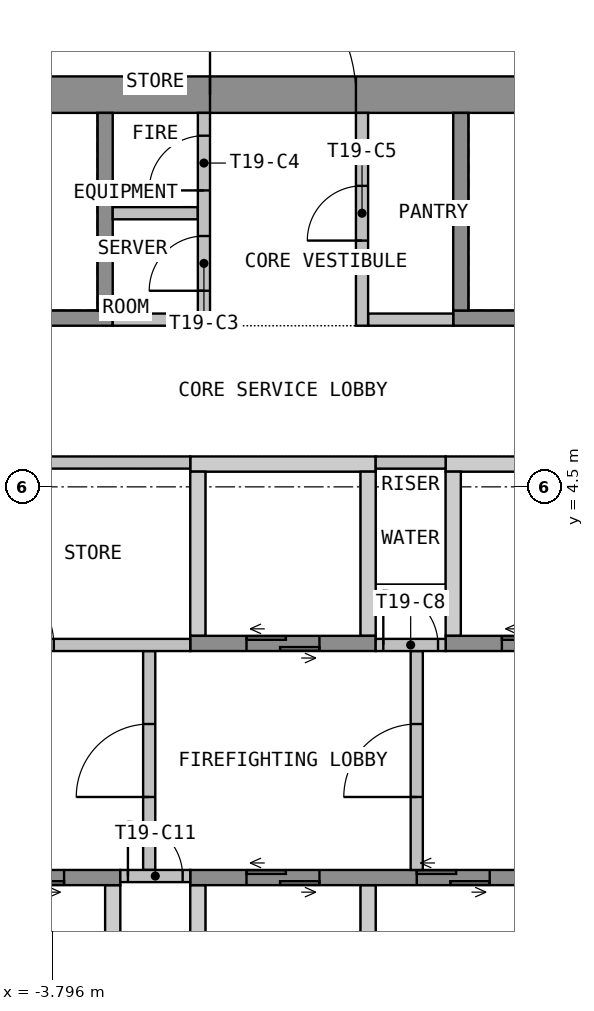
"""IFC4 building model, lengths in metres.
Left out: names, types, materials, properties, quantities, classifications, styles, units other than length and angle.
Written with IfcOpenShell. Run it as: python <this file> out.ifc"""

import sys

from ifc_helpers import new_model, si_unit, direction, frame, frame_2d, origin, place, context, subcontext, project, spatial, polyline, rectangle, outline, extrude, element, fill, save


model = new_model("IFC4")
c1 = context("Model", 3, precision=1e-05, world=origin(), true_north=direction((0.0, 1.0)))
c2 = subcontext(c1, "Body", "Model", "MODEL_VIEW")
j1 = project(units=[si_unit("LENGTHUNIT", "METRE"), si_unit("PLANEANGLEUNIT", "RADIAN")], contexts=[c1])
p1 = place(None, origin())
s1 = spatial("IfcSite", under=j1, at=p1, CompositionType="ELEMENT")
p2 = place(p1, origin())
s2 = spatial("IfcBuilding", under=s1, at=p2, CompositionType="ELEMENT")
p3 = place(p2, frame((0.0, 0.0, 258.6)))
s3 = spatial("IfcBuildingStorey", under=s2, at=p3, CompositionType="ELEMENT", Elevation=258.6)
p4 = place(p3, frame((-13.5, 10.95, 0.0), z_axis=(0.0, 0.0, 1.0), x_axis=(1.0, 0.0, 0.0)))
e1 = element("IfcWall", 1, at=p4, inside=s3, PredefinedType="SHEAR", context=c2, shape_type="SweptSolid", body=[
    extrude(rectangle(XDim=27.0, YDim=0.6, at=frame_2d((13.5, 0.0))), origin(), (0.0, 0.0, 1.0), 3.575),
])
p5 = place(p4, frame((12.3, 0.0, 0.0)))
e2 = element("IfcOpeningElement", 2, at=p5, cuts=e1, PredefinedType="OPENING", context=c2, shape_type="SweptSolid", body=[
    extrude(rectangle(XDim=2.4, YDim=2.1, at=frame_2d((1.2, 1.05))), frame((0.0, 0.31, 0.0), z_axis=(0.0, -1.0, 0.0), x_axis=(1.0, 0.0, 0.0)), (0.0, 0.0, 1.0), 0.62),
])
p6 = place(p4, frame((1.05, 0.0, 0.0)))
e3 = element("IfcOpeningElement", 3, at=p6, cuts=e1, PredefinedType="OPENING", context=c2, shape_type="SweptSolid", body=[
    extrude(rectangle(XDim=1.2, YDim=2.1, at=frame_2d((0.6, 1.05))), frame((0.0, 0.31, 0.0), z_axis=(0.0, -1.0, 0.0), x_axis=(1.0, 0.0, 0.0)), (0.0, 0.0, 1.0), 0.62),
])
p7 = place(p4, frame((24.75, 0.0, 0.0)))
e4 = element("IfcOpeningElement", 4, at=p7, cuts=e1, PredefinedType="OPENING", context=c2, shape_type="SweptSolid", body=[
    extrude(rectangle(XDim=1.2, YDim=2.1, at=frame_2d((0.6, 1.05))), frame((0.0, 0.31, 0.0), z_axis=(0.0, -1.0, 0.0), x_axis=(1.0, 0.0, 0.0)), (0.0, 0.0, 1.0), 0.62),
])
p8 = place(p3, origin())
e5 = element("IfcWall", 5, at=p8, inside=s3, PredefinedType="SHEAR", context=c2, shape_type="SweptSolid", body=[
    extrude(outline(polyline([(-1.525, 4.75), (1.525, 4.75), (1.525, 5.0), (-1.525, 5.0), (-1.525, 4.75)])), origin(), (0.0, 0.0, 1.0), 3.575),
])
p9 = place(p3, origin())
e6 = element("IfcWall", 6, at=p9, inside=s3, PredefinedType="SHEAR", context=c2, shape_type="SweptSolid", body=[
    extrude(outline(polyline([(2.675, 4.75), (8.525, 4.75), (8.525, 5.0), (2.675, 5.0), (2.675, 4.75)])), origin(), (0.0, 0.0, 1.0), 3.575),
])
p10 = place(p3, origin())
e7 = element("IfcWall", 7, at=p10, inside=s3, PredefinedType="SHEAR", context=c2, shape_type="SweptSolid", body=[
    extrude(outline(polyline([(-1.525, 2.05), (-1.275, 2.05), (-1.275, 4.75), (-1.525, 4.75), (-1.525, 2.05)])), origin(), (0.0, 0.0, 1.0), 3.575),
])
p11 = place(p3, origin())
e8 = element("IfcWall", 8, at=p11, inside=s3, PredefinedType="SHEAR", context=c2, shape_type="SweptSolid", body=[
    extrude(outline(polyline([(1.275, 2.05), (1.525, 2.05), (1.525, 4.75), (1.275, 4.75), (1.275, 2.05)])), origin(), (0.0, 0.0, 1.0), 3.575),
])
p12 = place(p3, origin())
e9 = element("IfcWall", 9, at=p12, inside=s3, PredefinedType="SHEAR", context=c2, shape_type="SweptSolid", body=[
    extrude(outline(polyline([(2.675, 2.05), (2.925, 2.05), (2.925, 4.75), (2.675, 4.75), (2.675, 2.05)])), origin(), (0.0, 0.0, 1.0), 3.575),
])
p13 = place(p3, frame((-1.525, 1.925, 0.0), z_axis=(0.0, 0.0, 1.0), x_axis=(1.0, 0.0, 0.0)))
e10 = element("IfcWall", 10, at=p13, inside=s3, PredefinedType="SHEAR", context=c2, shape_type="SweptSolid", body=[
    extrude(rectangle(XDim=3.05, YDim=0.25, at=frame_2d((1.525, 0.0))), origin(), (0.0, 0.0, 1.0), 3.575),
])
p14 = place(p13, frame((0.925, 0.0, 0.0)))
e11 = element("IfcOpeningElement", 11, at=p14, cuts=e10, PredefinedType="OPENING", context=c2, shape_type="SweptSolid", body=[
    extrude(rectangle(XDim=1.2, YDim=2.1, at=frame_2d((0.6, 1.05))), frame((0.0, 0.135, 0.0), z_axis=(0.0, -1.0, 0.0), x_axis=(1.0, 0.0, 0.0)), (0.0, 0.0, 1.0), 0.27),
])
p15 = place(p3, frame((2.675, 1.925, 0.0), z_axis=(0.0, 0.0, 1.0), x_axis=(1.0, 0.0, 0.0)))
e12 = element("IfcWall", 12, at=p15, inside=s3, PredefinedType="SHEAR", context=c2, shape_type="SweptSolid", body=[
    extrude(rectangle(XDim=5.85, YDim=0.25, at=frame_2d((2.925, 0.0))), origin(), (0.0, 0.0, 1.0), 3.575),
])
p16 = place(p15, frame((0.925, 0.0, 0.0)))
e13 = element("IfcOpeningElement", 13, at=p16, cuts=e12, PredefinedType="OPENING", context=c2, shape_type="SweptSolid", body=[
    extrude(rectangle(XDim=1.2, YDim=2.1, at=frame_2d((0.6, 1.05))), frame((0.0, 0.135, 0.0), z_axis=(0.0, -1.0, 0.0), x_axis=(1.0, 0.0, 0.0)), (0.0, 0.0, 1.0), 0.27),
])
p17 = place(p15, frame((3.725, 0.0, 0.0)))
e14 = element("IfcOpeningElement", 14, at=p17, cuts=e12, PredefinedType="OPENING", context=c2, shape_type="SweptSolid", body=[
    extrude(rectangle(XDim=1.2, YDim=2.1, at=frame_2d((0.6, 1.05))), frame((0.0, 0.135, 0.0), z_axis=(0.0, -1.0, 0.0), x_axis=(1.0, 0.0, 0.0)), (0.0, 0.0, 1.0), 0.27),
])
p18 = place(p3, origin())
e15 = element("IfcWall", 15, at=p18, inside=s3, PredefinedType="SHEAR", context=c2, shape_type="SweptSolid", body=[
    extrude(outline(polyline([(-2.925, -4.75), (-2.675, -4.75), (-2.675, -2.05), (-2.925, -2.05), (-2.925, -4.75)])), origin(), (0.0, 0.0, 1.0), 3.575),
])
p19 = place(p3, origin())
e16 = element("IfcWall", 16, at=p19, inside=s3, PredefinedType="SHEAR", context=c2, shape_type="SweptSolid", body=[
    extrude(outline(polyline([(-1.525, -4.75), (-1.275, -4.75), (-1.275, -2.05), (-1.525, -2.05), (-1.525, -4.75)])), origin(), (0.0, 0.0, 1.0), 3.575),
])
p20 = place(p3, origin())
e17 = element("IfcWall", 17, at=p20, inside=s3, PredefinedType="SHEAR", context=c2, shape_type="SweptSolid", body=[
    extrude(outline(polyline([(1.275, -4.75), (1.525, -4.75), (1.525, -2.05), (1.275, -2.05), (1.275, -4.75)])), origin(), (0.0, 0.0, 1.0), 3.575),
])
p21 = place(p3, frame((-11.325, -1.925, 0.0), z_axis=(0.0, 0.0, 1.0), x_axis=(1.0, 0.0, 0.0)))
e18 = element("IfcWall", 18, at=p21, inside=s3, PredefinedType="SHEAR", context=c2, shape_type="SweptSolid", body=[
    extrude(rectangle(XDim=8.65, YDim=0.25, at=frame_2d((4.325, 0.0))), origin(), (0.0, 0.0, 1.0), 3.575),
])
p22 = place(p21, frame((0.925, 0.0, 0.0)))
e19 = element("IfcOpeningElement", 19, at=p22, cuts=e18, PredefinedType="OPENING", context=c2, shape_type="SweptSolid", body=[
    extrude(rectangle(XDim=1.2, YDim=2.1, at=frame_2d((0.6, 1.05))), frame((0.0, 0.135, 0.0), z_axis=(0.0, -1.0, 0.0), x_axis=(1.0, 0.0, 0.0)), (0.0, 0.0, 1.0), 0.27),
])
p23 = place(p21, frame((3.725, 0.0, 0.0)))
e20 = element("IfcOpeningElement", 20, at=p23, cuts=e18, PredefinedType="OPENING", context=c2, shape_type="SweptSolid", body=[
    extrude(rectangle(XDim=1.2, YDim=2.1, at=frame_2d((0.6, 1.05))), frame((0.0, 0.135, 0.0), z_axis=(0.0, -1.0, 0.0), x_axis=(1.0, 0.0, 0.0)), (0.0, 0.0, 1.0), 0.27),
])
p24 = place(p21, frame((6.525, 0.0, 0.0)))
e21 = element("IfcOpeningElement", 21, at=p24, cuts=e18, PredefinedType="OPENING", context=c2, shape_type="SweptSolid", body=[
    extrude(rectangle(XDim=1.2, YDim=2.1, at=frame_2d((0.6, 1.05))), frame((0.0, 0.135, 0.0), z_axis=(0.0, -1.0, 0.0), x_axis=(1.0, 0.0, 0.0)), (0.0, 0.0, 1.0), 0.27),
])
p25 = place(p3, frame((-1.525, -1.925, 0.0), z_axis=(0.0, 0.0, 1.0), x_axis=(1.0, 0.0, 0.0)))
e22 = element("IfcWall", 22, at=p25, inside=s3, PredefinedType="SHEAR", context=c2, shape_type="SweptSolid", body=[
    extrude(rectangle(XDim=5.85, YDim=0.25, at=frame_2d((2.925, 0.0))), origin(), (0.0, 0.0, 1.0), 3.575),
])
p26 = place(p25, frame((0.925, 0.0, 0.0)))
e23 = element("IfcOpeningElement", 23, at=p26, cuts=e22, PredefinedType="OPENING", context=c2, shape_type="SweptSolid", body=[
    extrude(rectangle(XDim=1.2, YDim=2.1, at=frame_2d((0.6, 1.05))), frame((0.0, 0.135, 0.0), z_axis=(0.0, -1.0, 0.0), x_axis=(1.0, 0.0, 0.0)), (0.0, 0.0, 1.0), 0.27),
])
p27 = place(p25, frame((3.725, 0.0, 0.0)))
e24 = element("IfcOpeningElement", 24, at=p27, cuts=e22, PredefinedType="OPENING", context=c2, shape_type="SweptSolid", body=[
    extrude(rectangle(XDim=1.2, YDim=2.1, at=frame_2d((0.6, 1.05))), frame((0.0, 0.135, 0.0), z_axis=(0.0, -1.0, 0.0), x_axis=(1.0, 0.0, 0.0)), (0.0, 0.0, 1.0), 0.27),
])
p28 = place(p3, frame((-2.2, -1.8, 0.0), z_axis=(0.0, 0.0, 1.0), x_axis=(0.0, 1.0, 0.0)))
e25 = element("IfcWall", 25, at=p28, inside=s3, PredefinedType="PARTITIONING", context=c2, shape_type="SweptSolid", body=[
    extrude(rectangle(XDim=3.6, YDim=0.2, at=frame_2d((1.8, 0.0))), origin(), (0.0, 0.0, 1.0), 3.575),
])
p29 = place(p28, frame((1.2, 0.0, 0.0)))
e26 = element("IfcOpeningElement", 26, at=p29, cuts=e25, PredefinedType="OPENING", context=c2, shape_type="SweptSolid", body=[
    extrude(rectangle(XDim=1.2, YDim=2.1, at=frame_2d((0.6, 1.05))), frame((0.0, 0.11, 0.0), z_axis=(0.0, -1.0, 0.0), x_axis=(1.0, 0.0, 0.0)), (0.0, 0.0, 1.0), 0.22),
])
p30 = place(p3, frame((2.2, -1.8, 0.0), z_axis=(0.0, 0.0, 1.0), x_axis=(0.0, 1.0, 0.0)))
e27 = element("IfcWall", 27, at=p30, inside=s3, PredefinedType="PARTITIONING", context=c2, shape_type="SweptSolid", body=[
    extrude(rectangle(XDim=3.6, YDim=0.2, at=frame_2d((1.8, 0.0))), origin(), (0.0, 0.0, 1.0), 3.575),
])
p31 = place(p30, frame((1.2, 0.0, 0.0)))
e28 = element("IfcOpeningElement", 28, at=p31, cuts=e27, PredefinedType="OPENING", context=c2, shape_type="SweptSolid", body=[
    extrude(rectangle(XDim=1.2, YDim=2.1, at=frame_2d((0.6, 1.05))), frame((0.0, 0.11, 0.0), z_axis=(0.0, -1.0, 0.0), x_axis=(1.0, 0.0, 0.0)), (0.0, 0.0, 1.0), 0.22),
])
p32 = place(p3, frame((-12.9, 7.275, 0.0), z_axis=(0.0, 0.0, 1.0), x_axis=(1.0, 0.0, 0.0)))
e29 = element("IfcWall", 29, at=p32, inside=s3, PredefinedType="SHEAR", context=c2, shape_type="SweptSolid", body=[
    extrude(rectangle(XDim=10.1, YDim=0.25, at=frame_2d((5.05, 0.0))), origin(), (0.0, 0.0, 1.0), 3.575),
])
p33 = place(p32, frame((0.45, 0.0, 0.0)))
e30 = element("IfcOpeningElement", 30, at=p33, cuts=e29, PredefinedType="OPENING", context=c2, shape_type="SweptSolid", body=[
    extrude(rectangle(XDim=1.2, YDim=2.1, at=frame_2d((0.6, 1.05))), frame((0.0, 0.135, 0.0), z_axis=(0.0, -1.0, 0.0), x_axis=(1.0, 0.0, 0.0)), (0.0, 0.0, 1.0), 0.27),
])
p34 = place(p3, frame((-2.925, 7.4, 0.0), z_axis=(0.0, 0.0, 1.0), x_axis=(0.0, 1.0, 0.0)))
e31 = element("IfcWall", 31, at=p34, inside=s3, PredefinedType="SHEAR", context=c2, shape_type="SweptSolid", body=[
    extrude(rectangle(XDim=3.25, YDim=0.25, at=frame_2d((1.625, 0.0))), origin(), (0.0, 0.0, 1.0), 3.575),
])
p35 = place(p3, frame((2.8, 7.275, 0.0), z_axis=(0.0, 0.0, 1.0), x_axis=(1.0, 0.0, 0.0)))
e32 = element("IfcWall", 32, at=p35, inside=s3, PredefinedType="SHEAR", context=c2, shape_type="SweptSolid", body=[
    extrude(rectangle(XDim=10.1, YDim=0.25, at=frame_2d((5.05, 0.0))), origin(), (0.0, 0.0, 1.0), 3.575),
])
p36 = place(p35, frame((8.45, 0.0, 0.0)))
e33 = element("IfcOpeningElement", 33, at=p36, cuts=e32, PredefinedType="OPENING", context=c2, shape_type="SweptSolid", body=[
    extrude(rectangle(XDim=1.2, YDim=2.1, at=frame_2d((0.6, 1.05))), frame((0.0, 0.135, 0.0), z_axis=(0.0, -1.0, 0.0), x_axis=(1.0, 0.0, 0.0)), (0.0, 0.0, 1.0), 0.27),
])
p37 = place(p3, frame((2.925, 7.4, 0.0), z_axis=(0.0, 0.0, 1.0), x_axis=(0.0, 1.0, 0.0)))
e34 = element("IfcWall", 34, at=p37, inside=s3, PredefinedType="SHEAR", context=c2, shape_type="SweptSolid", body=[
    extrude(rectangle(XDim=3.25, YDim=0.25, at=frame_2d((1.625, 0.0))), origin(), (0.0, 0.0, 1.0), 3.575),
])
for number, where, z_axis, x_axis in (
    (35, (-2.8, 7.25, 0.0), (0.0, 0.0, 1.0), (1.0, 0.0, 0.0)),
    (36, (-2.8, 9.0, 0.0), (0.0, 0.0, 1.0), (1.0, 0.0, 0.0)),
    (37, (1.4, 7.25, 0.0), (0.0, 0.0, 1.0), (1.0, 0.0, 0.0)),
):
    element("IfcWall", number, at=place(p3, frame(where, z_axis=z_axis, x_axis=x_axis)), inside=s3, PredefinedType="PARTITIONING", context=c2, shape_type="SweptSolid", body=[
        extrude(rectangle(XDim=1.4, YDim=0.2, at=frame_2d((0.7, 0.0))), origin(), (0.0, 0.0, 1.0), 3.575),
    ])
p38 = place(p3, frame((-1.3, 7.15, 0.0), z_axis=(0.0, 0.0, 1.0), x_axis=(0.0, 1.0, 0.0)))
e38 = element("IfcWall", 38, at=p38, inside=s3, PredefinedType="PARTITIONING", context=c2, shape_type="SweptSolid", body=[
    extrude(rectangle(XDim=3.5, YDim=0.2, at=frame_2d((1.75, 0.0))), origin(), (0.0, 0.0, 1.0), 3.575),
])
p39 = place(p38, frame((0.575, 0.0, 0.0)))
e39 = element("IfcOpeningElement", 39, at=p39, cuts=e38, PredefinedType="OPENING", context=c2, shape_type="SweptSolid", body=[
    extrude(rectangle(XDim=0.9, YDim=2.1, at=frame_2d((0.45, 1.05))), frame((0.0, 0.11, 0.0), z_axis=(0.0, -1.0, 0.0), x_axis=(1.0, 0.0, 0.0)), (0.0, 0.0, 1.0), 0.22),
])
p40 = place(p38, frame((2.225, 0.0, 0.0)))
e40 = element("IfcOpeningElement", 40, at=p40, cuts=e38, PredefinedType="OPENING", context=c2, shape_type="SweptSolid", body=[
    extrude(rectangle(XDim=0.9, YDim=2.1, at=frame_2d((0.45, 1.05))), frame((0.0, 0.11, 0.0), z_axis=(0.0, -1.0, 0.0), x_axis=(1.0, 0.0, 0.0)), (0.0, 0.0, 1.0), 0.22),
])
p41 = place(p3, frame((1.3, 7.15, 0.0), z_axis=(0.0, 0.0, 1.0), x_axis=(0.0, 1.0, 0.0)))
e41 = element("IfcWall", 41, at=p41, inside=s3, PredefinedType="PARTITIONING", context=c2, shape_type="SweptSolid", body=[
    extrude(rectangle(XDim=3.5, YDim=0.2, at=frame_2d((1.75, 0.0))), origin(), (0.0, 0.0, 1.0), 3.575),
])
p42 = place(p41, frame((1.4, 0.0, 0.0)))
e42 = element("IfcOpeningElement", 42, at=p42, cuts=e41, PredefinedType="OPENING", context=c2, shape_type="SweptSolid", body=[
    extrude(rectangle(XDim=0.9, YDim=2.1, at=frame_2d((0.45, 1.05))), frame((0.0, 0.11, 0.0), z_axis=(0.0, -1.0, 0.0), x_axis=(1.0, 0.0, 0.0)), (0.0, 0.0, 1.0), 0.22),
])
p43 = place(p3, frame((-12.9, 1.9, 0.0), z_axis=(0.0, 0.0, 1.0), x_axis=(1.0, 0.0, 0.0)))
e43 = element("IfcWall", 43, at=p43, inside=s3, PredefinedType="PARTITIONING", context=c2, shape_type="SweptSolid", body=[
    extrude(rectangle(XDim=11.375, YDim=0.2, at=frame_2d((5.688, 0.0))), origin(), (0.0, 0.0, 1.0), 3.575),
])
p44 = place(p43, frame((2.244, 0.0, 0.0)))
e44 = element("IfcOpeningElement", 44, at=p44, cuts=e43, PredefinedType="OPENING", context=c2, shape_type="SweptSolid", body=[
    extrude(rectangle(XDim=1.2, YDim=2.1, at=frame_2d((0.6, 1.05))), frame((0.0, 0.11, 0.0), z_axis=(0.0, -1.0, 0.0), x_axis=(1.0, 0.0, 0.0)), (0.0, 0.0, 1.0), 0.22),
])
p45 = place(p43, frame((7.931, 0.0, 0.0)))
e45 = element("IfcOpeningElement", 45, at=p45, cuts=e43, PredefinedType="OPENING", context=c2, shape_type="SweptSolid", body=[
    extrude(rectangle(XDim=1.2, YDim=2.1, at=frame_2d((0.6, 1.05))), frame((0.0, 0.11, 0.0), z_axis=(0.0, -1.0, 0.0), x_axis=(1.0, 0.0, 0.0)), (0.0, 0.0, 1.0), 0.22),
])
p46 = place(p3, frame((-12.9, 4.9, 0.0), z_axis=(0.0, 0.0, 1.0), x_axis=(1.0, 0.0, 0.0)))
e46 = element("IfcWall", 46, at=p46, inside=s3, PredefinedType="PARTITIONING", context=c2, shape_type="SweptSolid", body=[
    extrude(rectangle(XDim=11.375, YDim=0.2, at=frame_2d((5.688, 0.0))), origin(), (0.0, 0.0, 1.0), 3.575),
])
p47 = place(p3, frame((1.525, 1.9, 0.0), z_axis=(0.0, 0.0, 1.0), x_axis=(1.0, 0.0, 0.0)))
e47 = element("IfcWall", 47, at=p47, inside=s3, PredefinedType="PARTITIONING", context=c2, shape_type="SweptSolid", body=[
    extrude(rectangle(XDim=1.15, YDim=0.2, at=frame_2d((0.575, 0.0))), origin(), (0.0, 0.0, 1.0), 3.575),
])
p48 = place(p47, frame((0.125, 0.0, 0.0)))
e48 = element("IfcOpeningElement", 48, at=p48, cuts=e47, PredefinedType="OPENING", context=c2, shape_type="SweptSolid", body=[
    extrude(rectangle(XDim=0.9, YDim=2.1, at=frame_2d((0.45, 1.05))), frame((0.0, 0.11, 0.0), z_axis=(0.0, -1.0, 0.0), x_axis=(1.0, 0.0, 0.0)), (0.0, 0.0, 1.0), 0.22),
])
p49 = place(p3, frame((1.525, 4.9, 0.0), z_axis=(0.0, 0.0, 1.0), x_axis=(1.0, 0.0, 0.0)))
e49 = element("IfcWall", 49, at=p49, inside=s3, PredefinedType="PARTITIONING", context=c2, shape_type="SweptSolid", body=[
    extrude(rectangle(XDim=1.15, YDim=0.2, at=frame_2d((0.575, 0.0))), origin(), (0.0, 0.0, 1.0), 3.575),
])
p50 = place(p3, frame((-2.675, -1.9, 0.0), z_axis=(0.0, 0.0, 1.0), x_axis=(1.0, 0.0, 0.0)))
e50 = element("IfcWall", 50, at=p50, inside=s3, PredefinedType="PARTITIONING", context=c2, shape_type="SweptSolid", body=[
    extrude(rectangle(XDim=1.15, YDim=0.2, at=frame_2d((0.575, 0.0))), origin(), (0.0, 0.0, 1.0), 3.575),
])
p51 = place(p50, frame((0.125, 0.0, 0.0)))
e51 = element("IfcOpeningElement", 51, at=p51, cuts=e50, PredefinedType="OPENING", context=c2, shape_type="SweptSolid", body=[
    extrude(rectangle(XDim=0.9, YDim=2.1, at=frame_2d((0.45, 1.05))), frame((0.0, 0.11, 0.0), z_axis=(0.0, -1.0, 0.0), x_axis=(1.0, 0.0, 0.0)), (0.0, 0.0, 1.0), 0.22),
])
p52 = place(p5, origin())
e52 = element("IfcDoor", 52, at=p52, inside=s3, OperationType="DOUBLE_DOOR_DOUBLE_SWING", PredefinedType="DOOR", context=c2, shape_type="SweptSolid", body=[
    extrude(rectangle(XDim=2.4, YDim=2.1, at=frame_2d((1.2, 1.05))), frame((0.0, 0.025, 0.0), z_axis=(0.0, -1.0, 0.0), x_axis=(1.0, 0.0, 0.0)), (0.0, 0.0, 1.0), 0.05),
])
fill(e2, e52)
p53 = place(p14, origin())
e53 = element("IfcDoor", 53, at=p53, inside=s3, OperationType="DOUBLE_DOOR_SLIDING", PredefinedType="DOOR", context=c2, shape_type="SweptSolid", body=[
    extrude(rectangle(XDim=1.2, YDim=2.1, at=frame_2d((0.6, 1.05))), frame((0.0, 0.025, 0.0), z_axis=(0.0, -1.0, 0.0), x_axis=(1.0, 0.0, 0.0)), (0.0, 0.0, 1.0), 0.05),
])
fill(e11, e53)
p54 = place(p16, origin())
e54 = element("IfcDoor", 54, at=p54, inside=s3, OperationType="DOUBLE_DOOR_SLIDING", PredefinedType="DOOR", context=c2, shape_type="SweptSolid", body=[
    extrude(rectangle(XDim=1.2, YDim=2.1, at=frame_2d((0.6, 1.05))), frame((0.0, 0.025, 0.0), z_axis=(0.0, -1.0, 0.0), x_axis=(1.0, 0.0, 0.0)), (0.0, 0.0, 1.0), 0.05),
])
fill(e13, e54)
p55 = place(p24, origin())
e55 = element("IfcDoor", 55, at=p55, inside=s3, OperationType="DOUBLE_DOOR_SLIDING", PredefinedType="DOOR", context=c2, shape_type="SweptSolid", body=[
    extrude(rectangle(XDim=1.2, YDim=2.1, at=frame_2d((0.6, 1.05))), frame((0.0, 0.025, 0.0), z_axis=(0.0, -1.0, 0.0), x_axis=(1.0, 0.0, 0.0)), (0.0, 0.0, 1.0), 0.05),
])
fill(e21, e55)
p56 = place(p26, origin())
e56 = element("IfcDoor", 56, at=p56, inside=s3, OperationType="DOUBLE_DOOR_SLIDING", PredefinedType="DOOR", context=c2, shape_type="SweptSolid", body=[
    extrude(rectangle(XDim=1.2, YDim=2.1, at=frame_2d((0.6, 1.05))), frame((0.0, 0.025, 0.0), z_axis=(0.0, -1.0, 0.0), x_axis=(1.0, 0.0, 0.0)), (0.0, 0.0, 1.0), 0.05),
])
fill(e23, e56)
p57 = place(p27, origin())
e57 = element("IfcDoor", 57, at=p57, inside=s3, OperationType="DOUBLE_DOOR_SLIDING", PredefinedType="DOOR", context=c2, shape_type="SweptSolid", body=[
    extrude(rectangle(XDim=1.2, YDim=2.1, at=frame_2d((0.6, 1.05))), frame((0.0, 0.025, 0.0), z_axis=(0.0, -1.0, 0.0), x_axis=(1.0, 0.0, 0.0)), (0.0, 0.0, 1.0), 0.05),
])
fill(e24, e57)
p58 = place(p29, origin())
e58 = element("IfcDoor", 58, at=p58, inside=s3, OperationType="SINGLE_SWING_LEFT", PredefinedType="DOOR", context=c2, shape_type="SweptSolid", body=[
    extrude(rectangle(XDim=1.2, YDim=2.1, at=frame_2d((0.6, 1.05))), frame((0.0, 0.025, 0.0), z_axis=(0.0, -1.0, 0.0), x_axis=(1.0, 0.0, 0.0)), (0.0, 0.0, 1.0), 0.05),
])
fill(e26, e58)
p59 = place(p31, origin())
e59 = element("IfcDoor", 59, at=p59, inside=s3, OperationType="SINGLE_SWING_LEFT", PredefinedType="DOOR", context=c2, shape_type="SweptSolid", body=[
    extrude(rectangle(XDim=1.2, YDim=2.1, at=frame_2d((0.6, 1.05))), frame((0.0, 0.025, 0.0), z_axis=(0.0, -1.0, 0.0), x_axis=(1.0, 0.0, 0.0)), (0.0, 0.0, 1.0), 0.05),
])
fill(e28, e59)
p60 = place(p39, origin())
e60 = element("IfcDoor", 60, at=p60, inside=s3, OperationType="SINGLE_SWING_LEFT", PredefinedType="DOOR", context=c2, shape_type="SweptSolid", body=[
    extrude(rectangle(XDim=0.9, YDim=2.1, at=frame_2d((0.45, 1.05))), frame((0.0, 0.025, 0.0), z_axis=(0.0, -1.0, 0.0), x_axis=(1.0, 0.0, 0.0)), (0.0, 0.0, 1.0), 0.05),
])
fill(e39, e60)
p61 = place(p40, origin())
e61 = element("IfcDoor", 61, at=p61, inside=s3, OperationType="SINGLE_SWING_LEFT", PredefinedType="DOOR", context=c2, shape_type="SweptSolid", body=[
    extrude(rectangle(XDim=0.9, YDim=2.1, at=frame_2d((0.45, 1.05))), frame((0.0, 0.025, 0.0), z_axis=(0.0, -1.0, 0.0), x_axis=(1.0, 0.0, 0.0)), (0.0, 0.0, 1.0), 0.05),
])
fill(e40, e61)
p62 = place(p42, origin())
e62 = element("IfcDoor", 62, at=p62, inside=s3, OperationType="SINGLE_SWING_LEFT", PredefinedType="DOOR", context=c2, shape_type="SweptSolid", body=[
    extrude(rectangle(XDim=0.9, YDim=2.1, at=frame_2d((0.45, 1.05))), frame((0.0, 0.025, 0.0), z_axis=(0.0, -1.0, 0.0), x_axis=(1.0, 0.0, 0.0)), (0.0, 0.0, 1.0), 0.05),
])
fill(e42, e62)
p63 = place(p45, origin())
e63 = element("IfcDoor", 63, at=p63, inside=s3, OperationType="SINGLE_SWING_RIGHT", PredefinedType="DOOR", context=c2, shape_type="SweptSolid", body=[
    extrude(rectangle(XDim=1.2, YDim=2.1, at=frame_2d((0.6, 1.05))), frame((0.0, 0.025, 0.0), z_axis=(0.0, -1.0, 0.0), x_axis=(1.0, 0.0, 0.0)), (0.0, 0.0, 1.0), 0.05),
])
fill(e45, e63)
p64 = place(p48, origin())
e64 = element("IfcDoor", 64, at=p64, inside=s3, OperationType="SINGLE_SWING_LEFT", PredefinedType="DOOR", context=c2, shape_type="SweptSolid", body=[
    extrude(rectangle(XDim=0.9, YDim=2.1, at=frame_2d((0.45, 1.05))), frame((0.0, 0.025, 0.0), z_axis=(0.0, -1.0, 0.0), x_axis=(1.0, 0.0, 0.0)), (0.0, 0.0, 1.0), 0.05),
])
fill(e48, e64)
p65 = place(p51, origin())
e65 = element("IfcDoor", 65, at=p65, inside=s3, OperationType="SINGLE_SWING_LEFT", PredefinedType="DOOR", context=c2, shape_type="SweptSolid", body=[
    extrude(rectangle(XDim=0.9, YDim=2.1, at=frame_2d((0.45, 1.05))), frame((0.0, 0.025, 0.0), z_axis=(0.0, -1.0, 0.0), x_axis=(1.0, 0.0, 0.0)), (0.0, 0.0, 1.0), 0.05),
])
fill(e51, e65)
save(model, sys.argv[1])
